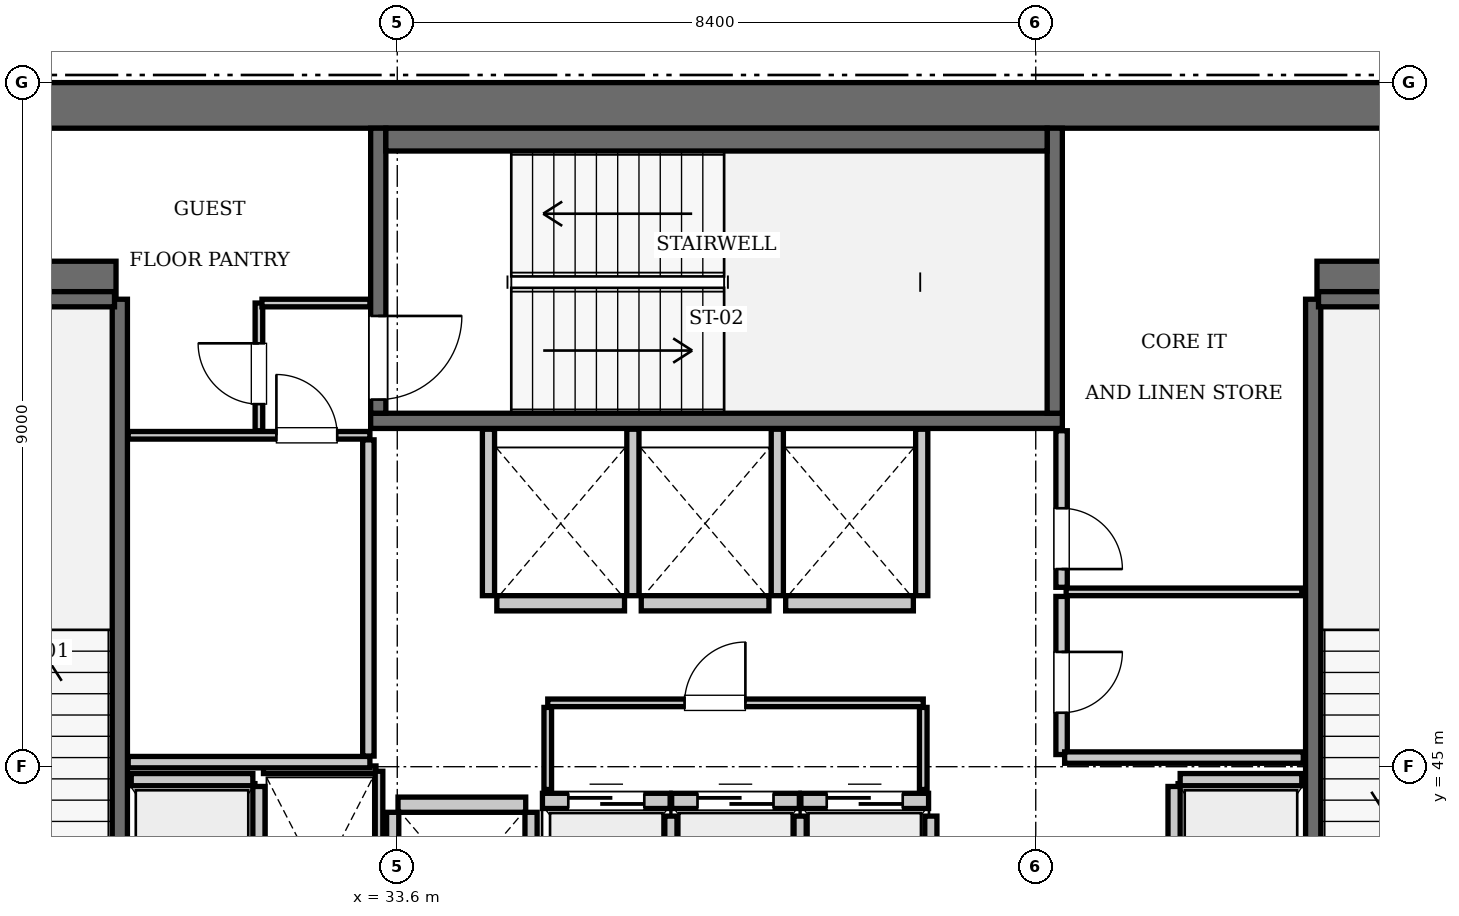
"""IFC4 building model, lengths in metres.
Left out: names, types, materials, properties, quantities, classifications, styles, units other than length and angle.
Written with IfcOpenShell. Run it as: python <this file> out.ifc"""

import sys

from ifc_helpers import new_model, si_unit, direction, frame, frame_2d, origin, place, context, subcontext, project, spatial, rectangle, extrude, element, fill, save


model = new_model("IFC4")
c1 = context("Model", 3, precision=1e-05, world=origin(), true_north=direction((0.0, 1.0)))
c2 = subcontext(c1, "Body", "Model", "MODEL_VIEW")
j1 = project(units=[si_unit("LENGTHUNIT", "METRE"), si_unit("PLANEANGLEUNIT", "RADIAN")], contexts=[c1])
p1 = place(None, origin())
s1 = spatial("IfcSite", under=j1, at=p1, CompositionType="ELEMENT")
p2 = place(p1, origin())
s2 = spatial("IfcBuilding", under=s1, at=p2, CompositionType="ELEMENT")
p3 = place(p2, frame((0.0, 0.0, 304.85)))
s3 = spatial("IfcBuildingStorey", under=s2, at=p3, CompositionType="ELEMENT", Elevation=304.85)
p4 = place(p3, frame((25.2, 53.7, 0.0), z_axis=(0.0, 0.0, 1.0), x_axis=(1.0, 0.0, 0.0)))
e1 = element("IfcWall", 1, at=p4, inside=s3, PredefinedType="SHEAR", context=c2, shape_type="SweptSolid", body=[
    extrude(rectangle(XDim=25.2, YDim=0.6, at=frame_2d((12.6, 0.0))), origin(), (0.0, 0.0, 1.0), 3.85),
])
p5 = place(p3, frame((25.8, 51.4, 0.0), z_axis=(0.0, 0.0, 1.0), x_axis=(1.0, 0.0, 0.0)))
e2 = element("IfcWall", 2, at=p5, inside=s3, PredefinedType="SHEAR", context=c2, shape_type="SweptSolid", body=[
    extrude(rectangle(XDim=4.1, YDim=0.5, at=frame_2d((2.05, 0.0))), origin(), (0.0, 0.0, 1.0), 3.85),
])
p6 = place(p3, frame((45.7, 51.4, 0.0), z_axis=(0.0, 0.0, 1.0), x_axis=(1.0, 0.0, 0.0)))
e3 = element("IfcWall", 3, at=p6, inside=s3, PredefinedType="SHEAR", context=c2, shape_type="SweptSolid", body=[
    extrude(rectangle(XDim=4.1, YDim=0.5, at=frame_2d((2.05, 0.0))), origin(), (0.0, 0.0, 1.0), 3.85),
])
p7 = place(p3, frame((29.95, 42.0, 0.0), z_axis=(0.0, 0.0, 1.0), x_axis=(0.0, 1.0, 0.0)))
e4 = element("IfcWall", 4, at=p7, inside=s3, PredefinedType="SOLIDWALL", context=c2, shape_type="SweptSolid", body=[
    extrude(rectangle(XDim=9.15, YDim=0.2, at=frame_2d((4.575, 0.0))), origin(), (0.0, 0.0, 1.0), 3.61),
])
p8 = place(p3, frame((26.38, 51.15, 0.0), z_axis=(0.0, 0.0, 1.0), x_axis=(1.0, 0.0, 0.0)))
e5 = element("IfcWall", 5, at=p8, inside=s3, PredefinedType="SOLIDWALL", context=c2, shape_type="SweptSolid", body=[
    extrude(rectangle(XDim=3.5, YDim=0.2, at=frame_2d((1.75, 0.0))), origin(), (0.0, 0.0, 1.0), 3.61),
])
p9 = place(p3, frame((33.25, 49.55, 0.0), z_axis=(0.0, 0.0, 1.0), x_axis=(1.0, 0.0, 0.0)))
e6 = element("IfcWall", 6, at=p9, inside=s3, PredefinedType="SOLIDWALL", context=c2, shape_type="SweptSolid", body=[
    extrude(rectangle(XDim=9.1, YDim=0.2, at=frame_2d((4.55, 0.0))), origin(), (0.0, 0.0, 1.0), 3.61),
])
p10 = place(p3, frame((42.25, 49.65, 0.0), z_axis=(0.0, 0.0, 1.0), x_axis=(0.0, 1.0, 0.0)))
e7 = element("IfcWall", 7, at=p10, inside=s3, PredefinedType="SOLIDWALL", context=c2, shape_type="SweptSolid", body=[
    extrude(rectangle(XDim=3.75, YDim=0.2, at=frame_2d((1.875, 0.0))), origin(), (0.0, 0.0, 1.0), 3.61),
])
p11 = place(p3, frame((33.35, 49.65, 0.0), z_axis=(0.0, 0.0, 1.0), x_axis=(0.0, 1.0, 0.0)))
e8 = element("IfcWall", 8, at=p11, inside=s3, PredefinedType="SOLIDWALL", context=c2, shape_type="SweptSolid", body=[
    extrude(rectangle(XDim=3.75, YDim=0.2, at=frame_2d((1.875, 0.0))), origin(), (0.0, 0.0, 1.0), 3.61),
])
p12 = place(p11, frame((0.18, 0.0, 0.0)))
e9 = element("IfcOpeningElement", 9, at=p12, cuts=e8, PredefinedType="OPENING", context=c2, shape_type="SweptSolid", body=[
    extrude(rectangle(XDim=1.1, YDim=2.15, at=frame_2d((0.55, 1.075))), frame((0.0, 0.11, 0.0), z_axis=(0.0, -1.0, 0.0), x_axis=(1.0, 0.0, 0.0)), (0.0, 0.0, 1.0), 0.22),
])
p13 = place(p3, frame((33.45, 53.25, 0.0), z_axis=(0.0, 0.0, 1.0), x_axis=(1.0, 0.0, 0.0)))
e10 = element("IfcWall", 10, at=p13, inside=s3, PredefinedType="SOLIDWALL", context=c2, shape_type="SweptSolid", body=[
    extrude(rectangle(XDim=8.7, YDim=0.3, at=frame_2d((4.35, 0.0))), origin(), (0.0, 0.0, 1.0), 3.61),
])
p14 = place(p3, frame((45.65, 42.0, 0.0), z_axis=(0.0, 0.0, 1.0), x_axis=(0.0, 1.0, 0.0)))
e11 = element("IfcWall", 11, at=p14, inside=s3, PredefinedType="SOLIDWALL", context=c2, shape_type="SweptSolid", body=[
    extrude(rectangle(XDim=9.15, YDim=0.2, at=frame_2d((4.575, 0.0))), origin(), (0.0, 0.0, 1.0), 3.61),
])
p15 = place(p3, frame((45.72, 51.15, 0.0), z_axis=(0.0, 0.0, 1.0), x_axis=(1.0, 0.0, 0.0)))
e12 = element("IfcWall", 12, at=p15, inside=s3, PredefinedType="SOLIDWALL", context=c2, shape_type="SweptSolid", body=[
    extrude(rectangle(XDim=3.5, YDim=0.2, at=frame_2d((1.75, 0.0))), origin(), (0.0, 0.0, 1.0), 3.61),
])
p16 = place(p3, frame((35.51, 44.55, 0.0), z_axis=(0.0, 0.0, 1.0), x_axis=(1.0, 0.0, 0.0)))
e13 = element("IfcWall", 13, at=p16, inside=s3, PredefinedType="SOLIDWALL", context=c2, shape_type="SweptSolid", body=[
    extrude(rectangle(XDim=1.68, YDim=0.2, at=frame_2d((0.84, 0.0))), origin(), (0.0, 0.0, 1.0), 3.61),
])
p17 = place(p16, frame((0.34, 0.0, 0.0)))
e14 = element("IfcOpeningElement", 14, at=p17, cuts=e13, PredefinedType="OPENING", context=c2, shape_type="SweptSolid", body=[
    extrude(rectangle(XDim=1.0, YDim=2.15, at=frame_2d((0.5, 1.075))), frame((0.0, 0.11, 0.0), z_axis=(0.0, -1.0, 0.0), x_axis=(1.0, 0.0, 0.0)), (0.0, 0.0, 1.0), 0.22),
])
p18 = place(p3, frame((37.21, 44.55, 0.0), z_axis=(0.0, 0.0, 1.0), x_axis=(1.0, 0.0, 0.0)))
e15 = element("IfcWall", 15, at=p18, inside=s3, PredefinedType="SOLIDWALL", context=c2, shape_type="SweptSolid", body=[
    extrude(rectangle(XDim=1.68, YDim=0.2, at=frame_2d((0.84, 0.0))), origin(), (0.0, 0.0, 1.0), 3.61),
])
p19 = place(p18, frame((0.34, 0.0, 0.0)))
e16 = element("IfcOpeningElement", 16, at=p19, cuts=e15, PredefinedType="OPENING", context=c2, shape_type="SweptSolid", body=[
    extrude(rectangle(XDim=1.0, YDim=2.15, at=frame_2d((0.5, 1.075))), frame((0.0, 0.11, 0.0), z_axis=(0.0, -1.0, 0.0), x_axis=(1.0, 0.0, 0.0)), (0.0, 0.0, 1.0), 0.22),
])
p20 = place(p3, frame((38.91, 44.55, 0.0), z_axis=(0.0, 0.0, 1.0), x_axis=(1.0, 0.0, 0.0)))
e17 = element("IfcWall", 17, at=p20, inside=s3, PredefinedType="SOLIDWALL", context=c2, shape_type="SweptSolid", body=[
    extrude(rectangle(XDim=1.68, YDim=0.2, at=frame_2d((0.84, 0.0))), origin(), (0.0, 0.0, 1.0), 3.61),
])
p21 = place(p20, frame((0.34, 0.0, 0.0)))
e18 = element("IfcOpeningElement", 18, at=p21, cuts=e17, PredefinedType="OPENING", context=c2, shape_type="SweptSolid", body=[
    extrude(rectangle(XDim=1.0, YDim=2.15, at=frame_2d((0.5, 1.075))), frame((0.0, 0.11, 0.0), z_axis=(0.0, -1.0, 0.0), x_axis=(1.0, 0.0, 0.0)), (0.0, 0.0, 1.0), 0.22),
])
p22 = place(p3, frame((34.91, 47.15, 0.0), z_axis=(0.0, 0.0, 1.0), x_axis=(1.0, 0.0, 0.0)))
e19 = element("IfcWall", 19, at=p22, inside=s3, PredefinedType="SOLIDWALL", context=c2, shape_type="SweptSolid", body=[
    extrude(rectangle(XDim=1.68, YDim=0.2, at=frame_2d((0.84, 0.0))), origin(), (0.0, 0.0, 1.0), 3.61),
])
for number, where, z_axis, x_axis in (
    (20, (36.81, 47.15, 0.0), (0.0, 0.0, 1.0), (1.0, 0.0, 0.0)),
    (21, (38.71, 47.15, 0.0), (0.0, 0.0, 1.0), (1.0, 0.0, 0.0)),
    (22, (33.61, 44.5, 0.0), (0.0, 0.0, 1.0), (1.0, 0.0, 0.0)),
):
    element("IfcWall", number, at=place(p3, frame(where, z_axis=z_axis, x_axis=x_axis)), inside=s3, PredefinedType="SOLIDWALL", context=c2, shape_type="SweptSolid", body=[
        extrude(rectangle(XDim=1.68, YDim=0.2, at=frame_2d((0.84, 0.0))), origin(), (0.0, 0.0, 1.0), 3.61),
    ])
p23 = place(p3, frame((30.1, 44.83, 0.0), z_axis=(0.0, 0.0, 1.0), x_axis=(1.0, 0.0, 0.0)))
e23 = element("IfcWall", 23, at=p23, inside=s3, PredefinedType="SOLIDWALL", context=c2, shape_type="SweptSolid", body=[
    extrude(rectangle(XDim=1.6, YDim=0.16, at=frame_2d((0.8, 0.0))), origin(), (0.0, 0.0, 1.0), 3.61),
])
p24 = place(p3, frame((31.78, 42.0, 0.0), z_axis=(0.0, 0.0, 1.0), x_axis=(0.0, 1.0, 0.0)))
e24 = element("IfcWall", 24, at=p24, inside=s3, PredefinedType="SOLIDWALL", context=c2, shape_type="SweptSolid", body=[
    extrude(rectangle(XDim=2.74, YDim=0.16, at=frame_2d((1.37, 0.0))), origin(), (0.0, 0.0, 1.0), 3.61),
])
p25 = place(p3, frame((43.9, 44.83, 0.0), z_axis=(0.0, 0.0, 1.0), x_axis=(1.0, 0.0, 0.0)))
e25 = element("IfcWall", 25, at=p25, inside=s3, PredefinedType="SOLIDWALL", context=c2, shape_type="SweptSolid", body=[
    extrude(rectangle(XDim=1.6, YDim=0.16, at=frame_2d((0.8, 0.0))), origin(), (0.0, 0.0, 1.0), 3.61),
])
p26 = place(p3, frame((43.82, 42.0, 0.0), z_axis=(0.0, 0.0, 1.0), x_axis=(0.0, 1.0, 0.0)))
e26 = element("IfcWall", 26, at=p26, inside=s3, PredefinedType="SOLIDWALL", context=c2, shape_type="SweptSolid", body=[
    extrude(rectangle(XDim=2.74, YDim=0.16, at=frame_2d((1.37, 0.0))), origin(), (0.0, 0.0, 1.0), 3.61),
])
for number, where, z_axis, x_axis in (
    (27, (37.2, 42.0, 0.0), (0.0, 0.0, 1.0), (0.0, 1.0, 0.0)),
    (28, (38.9, 42.0, 0.0), (0.0, 0.0, 1.0), (0.0, 1.0, 0.0)),
    (29, (40.62, 42.0, 0.0), (0.0, 0.0, 1.0), (0.0, 1.0, 0.0)),
):
    element("IfcWall", number, at=place(p3, frame(where, z_axis=z_axis, x_axis=x_axis)), inside=s3, PredefinedType="SOLIDWALL", context=c2, shape_type="SweptSolid", body=[
        extrude(rectangle(XDim=2.35, YDim=0.16, at=frame_2d((1.175, 0.0))), origin(), (0.0, 0.0, 1.0), 3.61),
    ])
for number, where, z_axis, x_axis in (
    (30, (34.8, 47.25, 0.0), (0.0, 0.0, 1.0), (0.0, 1.0, 0.0)),
    (31, (36.7, 47.25, 0.0), (0.0, 0.0, 1.0), (0.0, 1.0, 0.0)),
    (32, (38.6, 47.25, 0.0), (0.0, 0.0, 1.0), (0.0, 1.0, 0.0)),
    (33, (40.5, 47.25, 0.0), (0.0, 0.0, 1.0), (0.0, 1.0, 0.0)),
):
    element("IfcWall", number, at=place(p3, frame(where, z_axis=z_axis, x_axis=x_axis)), inside=s3, PredefinedType="SOLIDWALL", context=c2, shape_type="SweptSolid", body=[
        extrude(rectangle(XDim=2.19, YDim=0.16, at=frame_2d((1.095, 0.0))), origin(), (0.0, 0.0, 1.0), 3.61),
    ])
for number, where, z_axis, x_axis in (
    (34, (33.54, 42.0, 0.0), (0.0, 0.0, 1.0), (0.0, 1.0, 0.0)),
    (35, (35.36, 42.0, 0.0), (0.0, 0.0, 1.0), (0.0, 1.0, 0.0)),
):
    element("IfcWall", number, at=place(p3, frame(where, z_axis=z_axis, x_axis=x_axis)), inside=s3, PredefinedType="SOLIDWALL", context=c2, shape_type="SweptSolid", body=[
        extrude(rectangle(XDim=2.4, YDim=0.16, at=frame_2d((1.2, 0.0))), origin(), (0.0, 0.0, 1.0), 3.61),
    ])
p27 = place(p3, frame((31.84, 44.96, 0.0), z_axis=(0.0, 0.0, 1.0), x_axis=(1.0, 0.0, 0.0)))
e36 = element("IfcWall", 36, at=p27, inside=s3, PredefinedType="PARTITIONING", context=c2, shape_type="SweptSolid", body=[
    extrude(rectangle(XDim=1.48, YDim=0.1, at=frame_2d((0.74, 0.0))), origin(), (0.0, 0.0, 1.0), 3.61),
])
p28 = place(p3, frame((33.36, 42.06, 0.0), z_axis=(0.0, 0.0, 1.0), x_axis=(0.0, 1.0, 0.0)))
e37 = element("IfcWall", 37, at=p28, inside=s3, PredefinedType="PARTITIONING", context=c2, shape_type="SweptSolid", body=[
    extrude(rectangle(XDim=2.88, YDim=0.1, at=frame_2d((1.44, 0.0))), origin(), (0.0, 0.0, 1.0), 3.61),
])
p29 = place(p3, frame((35.58, 45.84, 0.0), z_axis=(0.0, 0.0, 1.0), x_axis=(1.0, 0.0, 0.0)))
e38 = element("IfcWall", 38, at=p29, inside=s3, PredefinedType="PARTITIONING", context=c2, shape_type="SweptSolid", body=[
    extrude(rectangle(XDim=4.94, YDim=0.1, at=frame_2d((2.47, 0.0))), origin(), (0.0, 0.0, 1.0), 3.61),
])
p30 = place(p29, frame((1.8, 0.0, 0.0)))
e39 = element("IfcOpeningElement", 39, at=p30, cuts=e38, PredefinedType="OPENING", context=c2, shape_type="SweptSolid", body=[
    extrude(rectangle(XDim=0.8, YDim=2.05, at=frame_2d((0.4, 1.025))), frame((0.0, 0.06, 0.0), z_axis=(0.0, -1.0, 0.0), x_axis=(1.0, 0.0, 0.0)), (0.0, 0.0, 1.0), 0.12),
])
for number, where, z_axis, x_axis in (
    (40, (35.58, 44.7, 0.0), (0.0, 0.0, 1.0), (0.0, 1.0, 0.0)),
    (41, (40.52, 44.7, 0.0), (0.0, 0.0, 1.0), (0.0, 1.0, 0.0)),
):
    element("IfcWall", number, at=place(p3, frame(where, z_axis=z_axis, x_axis=x_axis)), inside=s3, PredefinedType="PARTITIONING", context=c2, shape_type="SweptSolid", body=[
        extrude(rectangle(XDim=1.08, YDim=0.1, at=frame_2d((0.54, 0.0))), origin(), (0.0, 0.0, 1.0), 3.61),
    ])
p31 = place(p3, frame((30.06, 45.06, 0.0), z_axis=(0.0, 0.0, 1.0), x_axis=(1.0, 0.0, 0.0)))
e42 = element("IfcWall", 42, at=p31, inside=s3, PredefinedType="PARTITIONING", context=c2, shape_type="SweptSolid", body=[
    extrude(rectangle(XDim=3.18, YDim=0.15, at=frame_2d((1.59, 0.0))), origin(), (0.0, 0.0, 1.0), 3.61),
])
p32 = place(p3, frame((33.22, 45.14, 0.0), z_axis=(0.0, 0.0, 1.0), x_axis=(0.0, 1.0, 0.0)))
e43 = element("IfcWall", 43, at=p32, inside=s3, PredefinedType="PARTITIONING", context=c2, shape_type="SweptSolid", body=[
    extrude(rectangle(XDim=4.16, YDim=0.15, at=frame_2d((2.08, 0.0))), origin(), (0.0, 0.0, 1.0), 3.61),
])
p33 = place(p3, frame((30.06, 49.36, 0.0), z_axis=(0.0, 0.0, 1.0), x_axis=(1.0, 0.0, 0.0)))
e44 = element("IfcWall", 44, at=p33, inside=s3, PredefinedType="PARTITIONING", context=c2, shape_type="SweptSolid", body=[
    extrude(rectangle(XDim=3.18, YDim=0.1, at=frame_2d((1.59, 0.0))), origin(), (0.0, 0.0, 1.0), 3.61),
])
p34 = place(p33, frame((1.95, 0.0, 0.0)))
e45 = element("IfcOpeningElement", 45, at=p34, cuts=e44, PredefinedType="OPENING", context=c2, shape_type="SweptSolid", body=[
    extrude(rectangle(XDim=0.8, YDim=2.05, at=frame_2d((0.4, 1.025))), frame((0.0, 0.06, 0.0), z_axis=(0.0, -1.0, 0.0), x_axis=(1.0, 0.0, 0.0)), (0.0, 0.0, 1.0), 0.12),
])
p35 = place(p3, frame((31.78, 49.42, 0.0), z_axis=(0.0, 0.0, 1.0), x_axis=(0.0, 1.0, 0.0)))
e46 = element("IfcWall", 46, at=p35, inside=s3, PredefinedType="PARTITIONING", context=c2, shape_type="SweptSolid", body=[
    extrude(rectangle(XDim=1.68, YDim=0.1, at=frame_2d((0.84, 0.0))), origin(), (0.0, 0.0, 1.0), 3.61),
])
p36 = place(p35, frame((0.35, 0.0, 0.0)))
e47 = element("IfcOpeningElement", 47, at=p36, cuts=e46, PredefinedType="OPENING", context=c2, shape_type="SweptSolid", body=[
    extrude(rectangle(XDim=0.8, YDim=2.05, at=frame_2d((0.4, 1.025))), frame((0.0, 0.06, 0.0), z_axis=(0.0, -1.0, 0.0), x_axis=(1.0, 0.0, 0.0)), (0.0, 0.0, 1.0), 0.12),
])
p37 = place(p3, frame((31.82, 51.1, 0.0), z_axis=(0.0, 0.0, 1.0), x_axis=(1.0, 0.0, 0.0)))
e48 = element("IfcWall", 48, at=p37, inside=s3, PredefinedType="PARTITIONING", context=c2, shape_type="SweptSolid", body=[
    extrude(rectangle(XDim=1.42, YDim=0.1, at=frame_2d((0.71, 0.0))), origin(), (0.0, 0.0, 1.0), 3.61),
])
p38 = place(p3, frame((42.34, 45.16, 0.0), z_axis=(0.0, 0.0, 1.0), x_axis=(0.0, 1.0, 0.0)))
e49 = element("IfcWall", 49, at=p38, inside=s3, PredefinedType="PARTITIONING", context=c2, shape_type="SweptSolid", body=[
    extrude(rectangle(XDim=2.08, YDim=0.15, at=frame_2d((1.04, 0.0))), origin(), (0.0, 0.0, 1.0), 3.61),
])
p39 = place(p38, frame((0.55, 0.0, 0.0)))
e50 = element("IfcOpeningElement", 50, at=p39, cuts=e49, PredefinedType="OPENING", context=c2, shape_type="SweptSolid", body=[
    extrude(rectangle(XDim=0.8, YDim=2.05, at=frame_2d((0.4, 1.025))), frame((0.0, 0.085, 0.0), z_axis=(0.0, -1.0, 0.0), x_axis=(1.0, 0.0, 0.0)), (0.0, 0.0, 1.0), 0.17),
])
p40 = place(p3, frame((42.34, 47.36, 0.0), z_axis=(0.0, 0.0, 1.0), x_axis=(0.0, 1.0, 0.0)))
e51 = element("IfcWall", 51, at=p40, inside=s3, PredefinedType="PARTITIONING", context=c2, shape_type="SweptSolid", body=[
    extrude(rectangle(XDim=2.06, YDim=0.15, at=frame_2d((1.03, 0.0))), origin(), (0.0, 0.0, 1.0), 3.61),
])
p41 = place(p40, frame((0.24, 0.0, 0.0)))
e52 = element("IfcOpeningElement", 52, at=p41, cuts=e51, PredefinedType="OPENING", context=c2, shape_type="SweptSolid", body=[
    extrude(rectangle(XDim=0.8, YDim=2.05, at=frame_2d((0.4, 1.025))), frame((0.0, 0.085, 0.0), z_axis=(0.0, -1.0, 0.0), x_axis=(1.0, 0.0, 0.0)), (0.0, 0.0, 1.0), 0.17),
])
p42 = place(p3, frame((42.4, 47.3, 0.0), z_axis=(0.0, 0.0, 1.0), x_axis=(1.0, 0.0, 0.0)))
e53 = element("IfcWall", 53, at=p42, inside=s3, PredefinedType="PARTITIONING", context=c2, shape_type="SweptSolid", body=[
    extrude(rectangle(XDim=3.1, YDim=0.1, at=frame_2d((1.55, 0.0))), origin(), (0.0, 0.0, 1.0), 3.61),
])
p43 = place(p3, frame((42.38, 45.12, 0.0), z_axis=(0.0, 0.0, 1.0), x_axis=(1.0, 0.0, 0.0)))
e54 = element("IfcWall", 54, at=p43, inside=s3, PredefinedType="PARTITIONING", context=c2, shape_type="SweptSolid", body=[
    extrude(rectangle(XDim=3.14, YDim=0.15, at=frame_2d((1.57, 0.0))), origin(), (0.0, 0.0, 1.0), 3.61),
])
p44 = place(p12, frame((1.1, 0.0, 0.0), z_axis=(0.0, 0.0, 1.0), x_axis=(-1.0, 0.0, 0.0)))
e55 = element("IfcDoor", 55, at=p44, inside=s3, OperationType="SINGLE_SWING_LEFT", PredefinedType="DOOR", context=c2, shape_type="SweptSolid", body=[
    extrude(rectangle(XDim=1.1, YDim=2.15, at=frame_2d((0.55, 1.075))), frame((0.0, 0.025, 0.0), z_axis=(0.0, -1.0, 0.0), x_axis=(1.0, 0.0, 0.0)), (0.0, 0.0, 1.0), 0.05),
])
fill(e9, e55)
p45 = place(p17, origin())
e56 = element("IfcDoor", 56, at=p45, inside=s3, OperationType="SLIDING_TO_LEFT", PredefinedType="DOOR", context=c2, shape_type="SweptSolid", body=[
    extrude(rectangle(XDim=1.0, YDim=2.15, at=frame_2d((0.5, 1.075))), frame((0.0, 0.025, 0.0), z_axis=(0.0, -1.0, 0.0), x_axis=(1.0, 0.0, 0.0)), (0.0, 0.0, 1.0), 0.05),
])
fill(e14, e56)
p46 = place(p19, origin())
e57 = element("IfcDoor", 57, at=p46, inside=s3, OperationType="SLIDING_TO_LEFT", PredefinedType="DOOR", context=c2, shape_type="SweptSolid", body=[
    extrude(rectangle(XDim=1.0, YDim=2.15, at=frame_2d((0.5, 1.075))), frame((0.0, 0.025, 0.0), z_axis=(0.0, -1.0, 0.0), x_axis=(1.0, 0.0, 0.0)), (0.0, 0.0, 1.0), 0.05),
])
fill(e16, e57)
p47 = place(p21, origin())
e58 = element("IfcDoor", 58, at=p47, inside=s3, OperationType="SLIDING_TO_LEFT", PredefinedType="DOOR", context=c2, shape_type="SweptSolid", body=[
    extrude(rectangle(XDim=1.0, YDim=2.15, at=frame_2d((0.5, 1.075))), frame((0.0, 0.025, 0.0), z_axis=(0.0, -1.0, 0.0), x_axis=(1.0, 0.0, 0.0)), (0.0, 0.0, 1.0), 0.05),
])
fill(e18, e58)
p48 = place(p30, origin())
e59 = element("IfcDoor", 59, at=p48, inside=s3, OperationType="SINGLE_SWING_RIGHT", PredefinedType="DOOR", context=c2, shape_type="SweptSolid", body=[
    extrude(rectangle(XDim=0.8, YDim=2.05, at=frame_2d((0.4, 1.025))), frame((0.0, 0.025, 0.0), z_axis=(0.0, -1.0, 0.0), x_axis=(1.0, 0.0, 0.0)), (0.0, 0.0, 1.0), 0.05),
])
fill(e39, e59)
p49 = place(p34, origin())
e60 = element("IfcDoor", 60, at=p49, inside=s3, OperationType="SINGLE_SWING_LEFT", PredefinedType="DOOR", context=c2, shape_type="SweptSolid", body=[
    extrude(rectangle(XDim=0.8, YDim=2.05, at=frame_2d((0.4, 1.025))), frame((0.0, 0.025, 0.0), z_axis=(0.0, -1.0, 0.0), x_axis=(1.0, 0.0, 0.0)), (0.0, 0.0, 1.0), 0.05),
])
fill(e45, e60)
p50 = place(p36, origin())
e61 = element("IfcDoor", 61, at=p50, inside=s3, OperationType="SINGLE_SWING_RIGHT", PredefinedType="DOOR", context=c2, shape_type="SweptSolid", body=[
    extrude(rectangle(XDim=0.8, YDim=2.05, at=frame_2d((0.4, 1.025))), frame((0.0, 0.025, 0.0), z_axis=(0.0, -1.0, 0.0), x_axis=(1.0, 0.0, 0.0)), (0.0, 0.0, 1.0), 0.05),
])
fill(e47, e61)
p51 = place(p39, frame((0.8, 0.0, 0.0), z_axis=(0.0, 0.0, 1.0), x_axis=(-1.0, 0.0, 0.0)))
e62 = element("IfcDoor", 62, at=p51, inside=s3, OperationType="SINGLE_SWING_LEFT", PredefinedType="DOOR", context=c2, shape_type="SweptSolid", body=[
    extrude(rectangle(XDim=0.8, YDim=2.05, at=frame_2d((0.4, 1.025))), frame((0.0, 0.025, 0.0), z_axis=(0.0, -1.0, 0.0), x_axis=(1.0, 0.0, 0.0)), (0.0, 0.0, 1.0), 0.05),
])
fill(e50, e62)
p52 = place(p41, frame((0.8, 0.0, 0.0), z_axis=(0.0, 0.0, 1.0), x_axis=(-1.0, 0.0, 0.0)))
e63 = element("IfcDoor", 63, at=p52, inside=s3, OperationType="SINGLE_SWING_RIGHT", PredefinedType="DOOR", context=c2, shape_type="SweptSolid", body=[
    extrude(rectangle(XDim=0.8, YDim=2.05, at=frame_2d((0.4, 1.025))), frame((0.0, 0.025, 0.0), z_axis=(0.0, -1.0, 0.0), x_axis=(1.0, 0.0, 0.0)), (0.0, 0.0, 1.0), 0.05),
])
fill(e52, e63)
save(model, sys.argv[1])
